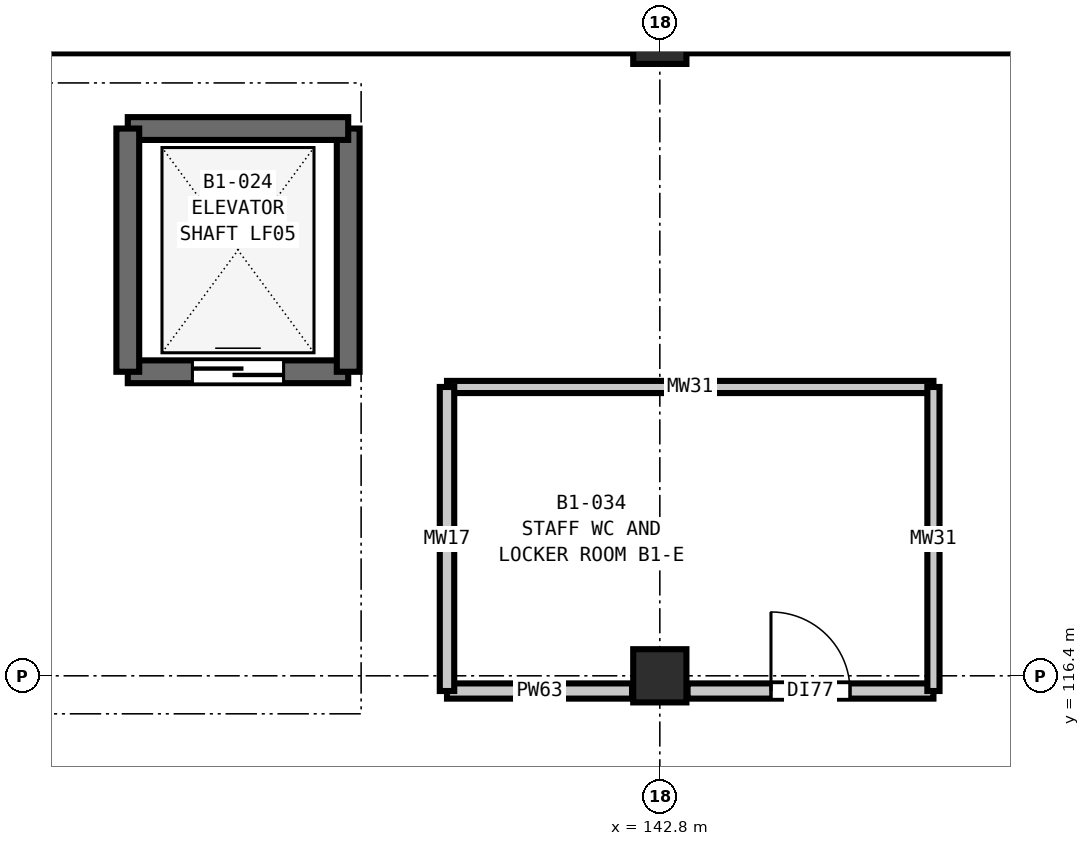
"""IFC4 building model, lengths in metres.
Left out: names, types, materials, properties, quantities, classifications, styles, units other than length and angle.
Written with IfcOpenShell. Run it as: python <this file> out.ifc"""

import sys

from ifc_helpers import new_model, si_unit, direction, frame, frame_2d, origin, origin_2d, place, context, subcontext, project, spatial, rectangle, extrude, element, fill, save


model = new_model("IFC4")
c1 = context("Model", 3, precision=1e-05, world=origin(), true_north=direction((0.0, 1.0)))
c2 = subcontext(c1, "Body", "Model", "MODEL_VIEW")
j1 = project(units=[si_unit("LENGTHUNIT", "METRE"), si_unit("PLANEANGLEUNIT", "RADIAN")], contexts=[c1])
p1 = place(None, origin())
s1 = spatial("IfcSite", under=j1, at=p1, CompositionType="ELEMENT")
p2 = place(p1, origin())
s2 = spatial("IfcBuilding", under=s1, at=p2, CompositionType="ELEMENT")
p3 = place(p2, frame((0.0, 0.0, -4.8)))
s3 = spatial("IfcBuildingStorey", under=s2, at=p3, CompositionType="ELEMENT", Elevation=-4.8)
for number, where, z_axis, x_axis in (
    (1, (142.8, 116.4, 0.0), (0.0, 0.0, 1.0), (1.0, 0.0, 0.0)),
    (2, (142.8, 124.8, 0.0), (0.0, 0.0, 1.0), (1.0, 0.0, 0.0)),
):
    element("IfcColumn", number, at=place(p3, frame(where, z_axis=z_axis, x_axis=x_axis)), inside=s3, PredefinedType="COLUMN", context=c2, shape_type="SweptSolid", body=[
        extrude(rectangle(XDim=0.7, YDim=0.7, at=origin_2d()), origin(), (0.0, 0.0, 1.0), 4.8),
    ])
p4 = place(p3, frame((134.4, 124.8, 0.0), z_axis=(0.0, 0.0, 1.0), x_axis=(1.0, 0.0, 0.0)))
e3 = element("IfcWall", 3, at=p4, inside=s3, PredefinedType="SOLIDWALL", context=c2, shape_type="SweptSolid", body=[
    extrude(rectangle(XDim=8.4, YDim=0.42, at=frame_2d((4.2, 0.0))), origin(), (0.0, 0.0, 1.0), 4.05),
])
p5 = place(p3, frame((142.8, 124.8, 0.0), z_axis=(0.0, 0.0, 1.0), x_axis=(1.0, 0.0, 0.0)))
e4 = element("IfcWall", 4, at=p5, inside=s3, PredefinedType="SOLIDWALL", context=c2, shape_type="SweptSolid", body=[
    extrude(rectangle(XDim=8.4, YDim=0.42, at=frame_2d((4.2, 0.0))), origin(), (0.0, 0.0, 1.0), 4.05),
])
p6 = place(p3, frame((135.8, 120.4, 0.0), z_axis=(0.0, 0.0, 1.0), x_axis=(1.0, 0.0, 0.0)))
e5 = element("IfcWall", 5, at=p6, inside=s3, PredefinedType="SHEAR", context=c2, shape_type="SweptSolid", body=[
    extrude(rectangle(XDim=2.9, YDim=0.3, at=frame_2d((1.45, 0.0))), origin(), (0.0, 0.0, 1.0), 4.8),
])
p7 = place(p6, frame((0.85, 0.0, 0.0)))
e6 = element("IfcOpeningElement", 6, at=p7, cuts=e5, PredefinedType="OPENING", context=c2, shape_type="SweptSolid", body=[
    extrude(rectangle(XDim=1.2, YDim=2.2, at=frame_2d((0.6, 1.1))), frame((0.0, 0.16, 0.0), z_axis=(0.0, -1.0, 0.0), x_axis=(1.0, 0.0, 0.0)), (0.0, 0.0, 1.0), 0.32),
])
p8 = place(p3, frame((138.7, 120.4, 0.0), z_axis=(0.0, 0.0, 1.0), x_axis=(0.0, 1.0, 0.0)))
e7 = element("IfcWall", 7, at=p8, inside=s3, PredefinedType="SHEAR", context=c2, shape_type="SweptSolid", body=[
    extrude(rectangle(XDim=3.2, YDim=0.3, at=frame_2d((1.6, 0.0))), origin(), (0.0, 0.0, 1.0), 4.8),
])
p9 = place(p3, frame((138.7, 123.6, 0.0), z_axis=(0.0, 0.0, 1.0), x_axis=(-1.0, 0.0, 0.0)))
e8 = element("IfcWall", 8, at=p9, inside=s3, PredefinedType="SHEAR", context=c2, shape_type="SweptSolid", body=[
    extrude(rectangle(XDim=2.9, YDim=0.3, at=frame_2d((1.45, 0.0))), origin(), (0.0, 0.0, 1.0), 4.8),
])
p10 = place(p3, frame((135.8, 123.6, 0.0), z_axis=(0.0, 0.0, 1.0), x_axis=(0.0, -1.0, 0.0)))
e9 = element("IfcWall", 9, at=p10, inside=s3, PredefinedType="SHEAR", context=c2, shape_type="SweptSolid", body=[
    extrude(rectangle(XDim=3.2, YDim=0.3, at=frame_2d((1.6, 0.0))), origin(), (0.0, 0.0, 1.0), 4.8),
])
p11 = place(p3, frame((143.165, 116.2, 0.0), z_axis=(0.0, 0.0, 1.0), x_axis=(1.0, 0.0, 0.0)))
e10 = element("IfcWall", 10, at=p11, inside=s3, PredefinedType="PARTITIONING", context=c2, shape_type="SweptSolid", body=[
    extrude(rectangle(XDim=3.235, YDim=0.2, at=frame_2d((1.617, 0.0))), origin(), (0.0, 0.0, 1.0), 3.985),
])
p12 = place(p11, frame((1.097, 0.0, 0.0)))
e11 = element("IfcOpeningElement", 11, at=p12, cuts=e10, PredefinedType="OPENING", context=c2, shape_type="SweptSolid", body=[
    extrude(rectangle(XDim=1.04, YDim=2.1, at=frame_2d((0.52, 1.05))), frame((0.0, 0.11, 0.0), z_axis=(0.0, -1.0, 0.0), x_axis=(1.0, 0.0, 0.0)), (0.0, 0.0, 1.0), 0.22),
])
p13 = place(p3, frame((140.0, 116.2, 0.0), z_axis=(0.0, 0.0, 1.0), x_axis=(1.0, 0.0, 0.0)))
e12 = element("IfcWall", 12, at=p13, inside=s3, PredefinedType="PARTITIONING", context=c2, shape_type="SweptSolid", body=[
    extrude(rectangle(XDim=2.435, YDim=0.2, at=frame_2d((1.218, 0.0))), origin(), (0.0, 0.0, 1.0), 3.985),
])
p14 = place(p3, frame((140.0, 120.2, 0.0), z_axis=(0.0, 0.0, 1.0), x_axis=(1.0, 0.0, 0.0)))
e13 = element("IfcWall", 13, at=p14, inside=s3, PredefinedType="PLUMBINGWALL", context=c2, shape_type="SweptSolid", body=[
    extrude(rectangle(XDim=6.4, YDim=0.16, at=frame_2d((3.2, 0.0))), origin(), (0.0, 0.0, 1.0), 4.44),
])
p15 = place(p3, frame((140.0, 116.2, 0.0), z_axis=(0.0, 0.0, 1.0), x_axis=(0.0, 1.0, 0.0)))
e14 = element("IfcWall", 14, at=p15, inside=s3, PredefinedType="PLUMBINGWALL", context=c2, shape_type="SweptSolid", body=[
    extrude(rectangle(XDim=4.0, YDim=0.19, at=frame_2d((2.0, 0.0))), origin(), (0.0, 0.0, 1.0), 4.44),
])
p16 = place(p3, frame((146.4, 116.2, 0.0), z_axis=(0.0, 0.0, 1.0), x_axis=(0.0, 1.0, 0.0)))
e15 = element("IfcWall", 15, at=p16, inside=s3, PredefinedType="PLUMBINGWALL", context=c2, shape_type="SweptSolid", body=[
    extrude(rectangle(XDim=4.0, YDim=0.16, at=frame_2d((2.0, 0.0))), origin(), (0.0, 0.0, 1.0), 4.44),
])
p17 = place(p7, origin())
e16 = element("IfcDoor", 16, at=p17, inside=s3, OperationType="DOUBLE_DOOR_SLIDING", PredefinedType="DOOR", context=c2, shape_type="SweptSolid", body=[
    extrude(rectangle(XDim=1.2, YDim=2.2, at=frame_2d((0.6, 1.1))), frame((0.0, 0.025, 0.0), z_axis=(0.0, -1.0, 0.0), x_axis=(1.0, 0.0, 0.0)), (0.0, 0.0, 1.0), 0.05),
])
fill(e6, e16)
p18 = place(p12, origin())
e17 = element("IfcDoor", 17, at=p18, inside=s3, OperationType="SINGLE_SWING_LEFT", PredefinedType="DOOR", context=c2, shape_type="SweptSolid", body=[
    extrude(rectangle(XDim=1.04, YDim=2.1, at=frame_2d((0.52, 1.05))), frame((0.0, 0.025, 0.0), z_axis=(0.0, -1.0, 0.0), x_axis=(1.0, 0.0, 0.0)), (0.0, 0.0, 1.0), 0.05),
])
fill(e11, e17)
save(model, sys.argv[1])
